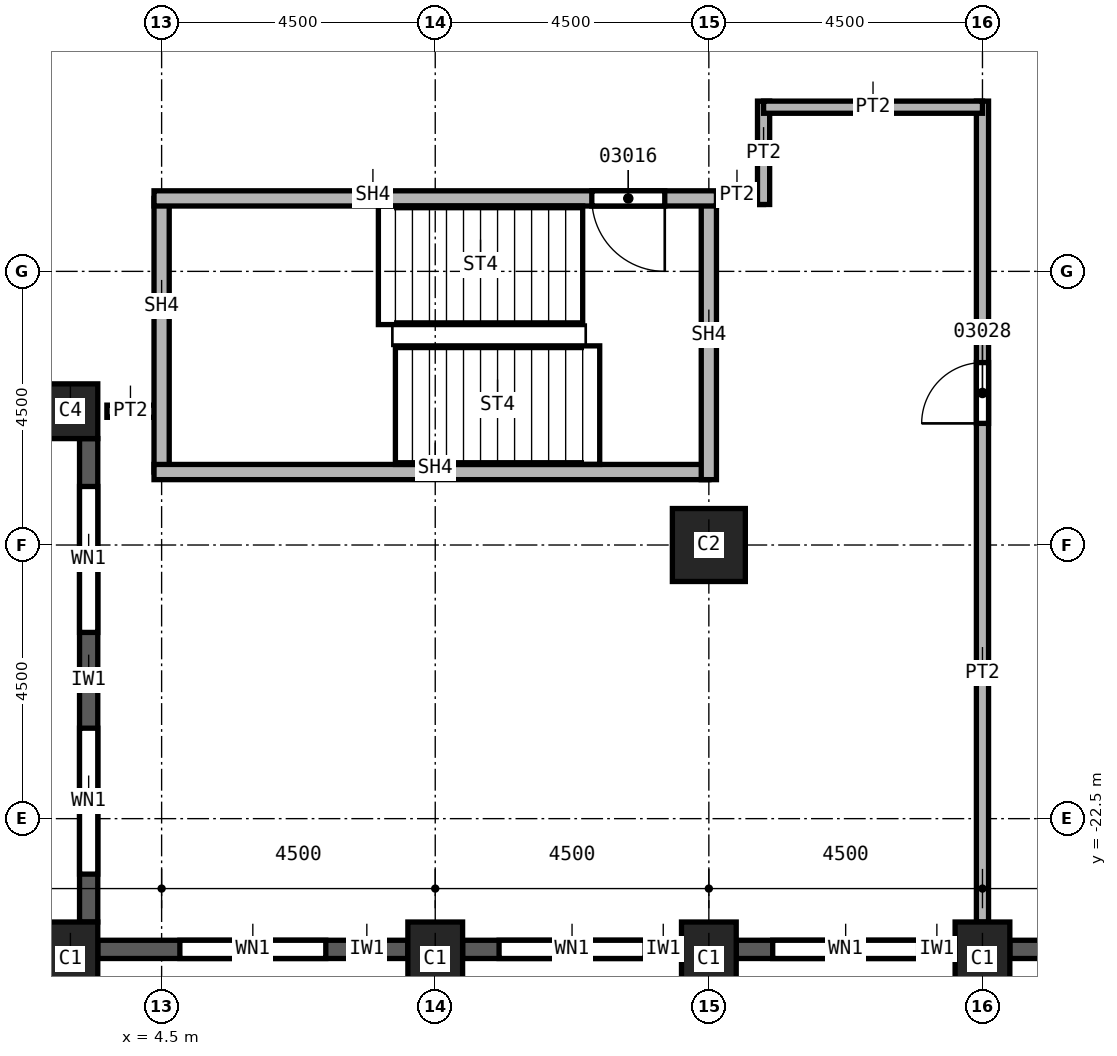
"""IFC4 building model, lengths in metres.
Left out: names, types, materials, properties, quantities, classifications, styles, units other than length and angle.
Written with IfcOpenShell. Run it as: python <this file> out.ifc"""

import sys

from ifc_helpers import new_model, si_unit, direction, frame, frame_2d, origin, origin_2d, place, context, subcontext, project, spatial, rectangle, extrude, element, fill, save


model = new_model("IFC4")
c1 = context("Model", 3, precision=1e-05, world=origin(), true_north=direction((0.0, 1.0)))
c2 = subcontext(c1, "Body", "Model", "MODEL_VIEW")
j1 = project(units=[si_unit("LENGTHUNIT", "METRE"), si_unit("PLANEANGLEUNIT", "RADIAN")], contexts=[c1])
p1 = place(None, origin())
s1 = spatial("IfcSite", under=j1, at=p1, CompositionType="ELEMENT")
p2 = place(p1, origin())
s2 = spatial("IfcBuilding", under=s1, at=p2, CompositionType="ELEMENT")
p3 = place(p2, frame((0.0, 0.0, 92.0)))
s3 = spatial("IfcBuildingStorey", under=s2, at=p3, CompositionType="ELEMENT", Elevation=92.0)
p4 = place(p3, frame((13.5, -18.0, 0.0), z_axis=(0.0, 0.0, 1.0), x_axis=(1.0, 0.0, 0.0)))
e1 = element("IfcColumn", 1, at=p4, inside=s3, PredefinedType="COLUMN", context=c2, shape_type="SweptSolid", body=[
    extrude(rectangle(XDim=1.2, YDim=1.2, at=origin_2d()), origin(), (0.0, 0.0, 1.0), 3.7),
])
for number, where, z_axis, x_axis in (
    (2, (3.0, -24.8, 0.0), (0.0, 0.0, 1.0), (1.0, 0.0, 0.0)),
    (3, (9.0, -24.8, 0.0), (0.0, 0.0, 1.0), (1.0, 0.0, 0.0)),
    (4, (13.5, -24.8, 0.0), (0.0, 0.0, 1.0), (1.0, 0.0, 0.0)),
    (5, (18.0, -24.8, 0.0), (0.0, 0.0, 1.0), (1.0, 0.0, 0.0)),
):
    element("IfcColumn", number, at=place(p3, frame(where, z_axis=z_axis, x_axis=x_axis)), inside=s3, PredefinedType="COLUMN", context=c2, shape_type="SweptSolid", body=[
        extrude(rectangle(XDim=0.9, YDim=1.2, at=origin_2d()), origin(), (0.0, 0.0, 1.0), 3.7),
    ])
p5 = place(p3, frame((3.0, -15.8, 0.0), z_axis=(0.0, 0.0, 1.0), x_axis=(1.0, 0.0, 0.0)))
e6 = element("IfcColumn", 6, at=p5, inside=s3, PredefinedType="COLUMN", context=c2, shape_type="SweptSolid", body=[
    extrude(rectangle(XDim=0.9, YDim=0.9, at=origin_2d()), origin(), (0.0, 0.0, 1.0), 3.7),
])
p6 = place(p3, frame((3.3, -16.25, 0.0), z_axis=(0.0, 0.0, 1.0), x_axis=(0.0, -1.0, 0.0)))
e7 = element("IfcWall", 7, at=p6, inside=s3, PredefinedType="SOLIDWALL", context=c2, shape_type="SweptSolid", body=[
    extrude(rectangle(XDim=7.95, YDim=0.3, at=frame_2d((3.975, 0.0))), origin(), (0.0, 0.0, 1.0), 3.1),
])
p7 = place(p6, frame((0.788, 0.0, 0.8)))
e8 = element("IfcOpeningElement", 8, at=p7, cuts=e7, PredefinedType="OPENING", context=c2, shape_type="SweptSolid", body=[
    extrude(rectangle(XDim=2.4, YDim=1.95, at=frame_2d((1.2, 0.975))), frame((0.0, 0.15, 0.0), z_axis=(0.0, -1.0, 0.0), x_axis=(1.0, 0.0, 0.0)), (0.0, 0.0, 1.0), 0.3),
])
p8 = place(p6, frame((4.762, 0.0, 0.8)))
e9 = element("IfcOpeningElement", 9, at=p8, cuts=e7, PredefinedType="OPENING", context=c2, shape_type="SweptSolid", body=[
    extrude(rectangle(XDim=2.4, YDim=1.95, at=frame_2d((1.2, 0.975))), frame((0.0, 0.15, 0.0), z_axis=(0.0, -1.0, 0.0), x_axis=(1.0, 0.0, 0.0)), (0.0, 0.0, 1.0), 0.3),
])
p9 = place(p3, frame((3.45, -24.65, 0.0), z_axis=(0.0, 0.0, 1.0), x_axis=(1.0, 0.0, 0.0)))
e10 = element("IfcWall", 10, at=p9, inside=s3, PredefinedType="SOLIDWALL", context=c2, shape_type="SweptSolid", body=[
    extrude(rectangle(XDim=5.1, YDim=0.3, at=frame_2d((2.55, 0.0))), origin(), (0.0, 0.0, 1.0), 3.1),
])
p10 = place(p9, frame((1.35, 0.0, 0.8)))
e11 = element("IfcOpeningElement", 11, at=p10, cuts=e10, PredefinedType="OPENING", context=c2, shape_type="SweptSolid", body=[
    extrude(rectangle(XDim=2.4, YDim=1.95, at=frame_2d((1.2, 0.975))), frame((0.0, 0.15, 0.0), z_axis=(0.0, -1.0, 0.0), x_axis=(1.0, 0.0, 0.0)), (0.0, 0.0, 1.0), 0.3),
])
p11 = place(p3, frame((9.45, -24.65, 0.0), z_axis=(0.0, 0.0, 1.0), x_axis=(1.0, 0.0, 0.0)))
e12 = element("IfcWall", 12, at=p11, inside=s3, PredefinedType="SOLIDWALL", context=c2, shape_type="SweptSolid", body=[
    extrude(rectangle(XDim=3.6, YDim=0.3, at=frame_2d((1.8, 0.0))), origin(), (0.0, 0.0, 1.0), 3.1),
])
p12 = place(p11, frame((0.6, 0.0, 0.8)))
e13 = element("IfcOpeningElement", 13, at=p12, cuts=e12, PredefinedType="OPENING", context=c2, shape_type="SweptSolid", body=[
    extrude(rectangle(XDim=2.4, YDim=1.95, at=frame_2d((1.2, 0.975))), frame((0.0, 0.15, 0.0), z_axis=(0.0, -1.0, 0.0), x_axis=(1.0, 0.0, 0.0)), (0.0, 0.0, 1.0), 0.3),
])
p13 = place(p3, frame((13.95, -24.65, 0.0), z_axis=(0.0, 0.0, 1.0), x_axis=(1.0, 0.0, 0.0)))
e14 = element("IfcWall", 14, at=p13, inside=s3, PredefinedType="SOLIDWALL", context=c2, shape_type="SweptSolid", body=[
    extrude(rectangle(XDim=3.6, YDim=0.3, at=frame_2d((1.8, 0.0))), origin(), (0.0, 0.0, 1.0), 3.1),
])
p14 = place(p13, frame((0.6, 0.0, 0.8)))
e15 = element("IfcOpeningElement", 15, at=p14, cuts=e14, PredefinedType="OPENING", context=c2, shape_type="SweptSolid", body=[
    extrude(rectangle(XDim=2.4, YDim=1.95, at=frame_2d((1.2, 0.975))), frame((0.0, 0.15, 0.0), z_axis=(0.0, -1.0, 0.0), x_axis=(1.0, 0.0, 0.0)), (0.0, 0.0, 1.0), 0.3),
])
p15 = place(p3, frame((18.45, -24.65, 0.0), z_axis=(0.0, 0.0, 1.0), x_axis=(1.0, 0.0, 0.0)))
e16 = element("IfcWall", 16, at=p15, inside=s3, PredefinedType="SOLIDWALL", context=c2, shape_type="SweptSolid", body=[
    extrude(rectangle(XDim=3.6, YDim=0.3, at=frame_2d((1.8, 0.0))), origin(), (0.0, 0.0, 1.0), 3.1),
])
p16 = place(p15, frame((0.625, 0.0, 0.8)))
e17 = element("IfcOpeningElement", 17, at=p16, cuts=e16, PredefinedType="OPENING", context=c2, shape_type="SweptSolid", body=[
    extrude(rectangle(XDim=0.6, YDim=1.95, at=frame_2d((0.3, 0.975))), frame((0.0, 0.15, 0.0), z_axis=(0.0, -1.0, 0.0), x_axis=(1.0, 0.0, 0.0)), (0.0, 0.0, 1.0), 0.3),
])
p17 = place(p15, frame((1.825, 0.0, 0.8)))
e18 = element("IfcOpeningElement", 18, at=p17, cuts=e16, PredefinedType="OPENING", context=c2, shape_type="SweptSolid", body=[
    extrude(rectangle(XDim=1.0, YDim=1.95, at=frame_2d((0.5, 0.975))), frame((0.0, 0.15, 0.0), z_axis=(0.0, -1.0, 0.0), x_axis=(1.0, 0.0, 0.0)), (0.0, 0.0, 1.0), 0.3),
])
p18 = place(p3, frame((4.5, -15.8, 0.0), z_axis=(0.0, 0.0, 1.0), x_axis=(-1.0, 0.0, 0.0)))
e19 = element("IfcWall", 19, at=p18, inside=s3, PredefinedType="PARTITIONING", context=c2, shape_type="SweptSolid", body=[
    extrude(rectangle(XDim=0.9, YDim=0.2, at=frame_2d((0.45, 0.0))), origin(), (0.0, 0.0, 1.0), 3.7),
])
p19 = place(p3, frame((14.4, -12.3, 0.0), z_axis=(0.0, 0.0, 1.0), x_axis=(-1.0, 0.0, 0.0)))
e20 = element("IfcWall", 20, at=p19, inside=s3, PredefinedType="PARTITIONING", context=c2, shape_type="SweptSolid", body=[
    extrude(rectangle(XDim=1.025, YDim=0.2, at=frame_2d((0.512, 0.0))), origin(), (0.0, 0.0, 1.0), 3.7),
])
p20 = place(p3, frame((14.4, -10.7, 0.0), z_axis=(0.0, 0.0, 1.0), x_axis=(0.0, -1.0, 0.0)))
e21 = element("IfcWall", 21, at=p20, inside=s3, PredefinedType="PARTITIONING", context=c2, shape_type="SweptSolid", body=[
    extrude(rectangle(XDim=1.7, YDim=0.2, at=frame_2d((0.85, 0.0))), origin(), (0.0, 0.0, 1.0), 3.7),
])
p21 = place(p3, frame((18.0, -24.2, 0.0), z_axis=(0.0, 0.0, 1.0), x_axis=(0.0, 1.0, 0.0)))
e22 = element("IfcWall", 22, at=p21, inside=s3, PredefinedType="PARTITIONING", context=c2, shape_type="SweptSolid", body=[
    extrude(rectangle(XDim=13.5, YDim=0.2, at=frame_2d((6.75, 0.0))), origin(), (0.0, 0.0, 1.0), 3.7),
])
p22 = place(p21, frame((8.2, 0.0, 0.0)))
e23 = element("IfcOpeningElement", 23, at=p22, cuts=e22, PredefinedType="OPENING", context=c2, shape_type="SweptSolid", body=[
    extrude(rectangle(XDim=1.0, YDim=2.1, at=frame_2d((0.5, 1.05))), frame((0.0, 0.1, 0.0), z_axis=(0.0, -1.0, 0.0), x_axis=(1.0, 0.0, 0.0)), (0.0, 0.0, 1.0), 0.2),
])
p23 = place(p3, frame((18.0, -10.8, 0.0), z_axis=(0.0, 0.0, 1.0), x_axis=(-1.0, 0.0, 0.0)))
e24 = element("IfcWall", 24, at=p23, inside=s3, PredefinedType="PARTITIONING", context=c2, shape_type="SweptSolid", body=[
    extrude(rectangle(XDim=3.6, YDim=0.2, at=frame_2d((1.8, 0.0))), origin(), (0.0, 0.0, 1.0), 3.7),
])
p24 = place(p3, frame((4.5, -16.8, 0.0), z_axis=(0.0, 0.0, 1.0), x_axis=(0.0, 1.0, 0.0)))
e25 = element("IfcWall", 25, at=p24, inside=s3, PredefinedType="SOLIDWALL", context=c2, shape_type="SweptSolid", body=[
    extrude(rectangle(XDim=4.5, YDim=0.25, at=frame_2d((2.25, 0.0))), origin(), (0.0, 0.0, 1.0), 3.7),
])
p25 = place(p3, frame((13.5, -16.8, 0.0), z_axis=(0.0, 0.0, 1.0), x_axis=(-1.0, 0.0, 0.0)))
e26 = element("IfcWall", 26, at=p25, inside=s3, PredefinedType="SOLIDWALL", context=c2, shape_type="SweptSolid", body=[
    extrude(rectangle(XDim=9.125, YDim=0.25, at=frame_2d((4.562, 0.0))), origin(), (0.0, 0.0, 1.0), 3.7),
])
p26 = place(p3, frame((13.5, -12.3, 0.0), z_axis=(0.0, 0.0, 1.0), x_axis=(0.0, -1.0, 0.0)))
e27 = element("IfcWall", 27, at=p26, inside=s3, PredefinedType="SOLIDWALL", context=c2, shape_type="SweptSolid", body=[
    extrude(rectangle(XDim=4.625, YDim=0.25, at=frame_2d((2.312, 0.0))), origin(), (0.0, 0.0, 1.0), 3.7),
])
p27 = place(p3, frame((13.625, -12.3, 0.0), z_axis=(0.0, 0.0, 1.0), x_axis=(-1.0, 0.0, 0.0)))
e28 = element("IfcWall", 28, at=p27, inside=s3, PredefinedType="SOLIDWALL", context=c2, shape_type="SweptSolid", body=[
    extrude(rectangle(XDim=9.25, YDim=0.25, at=frame_2d((4.625, 0.0))), origin(), (0.0, 0.0, 1.0), 3.7),
])
p28 = place(p27, frame((0.85, 0.0, 0.0)))
e29 = element("IfcOpeningElement", 29, at=p28, cuts=e28, PredefinedType="OPENING", context=c2, shape_type="SweptSolid", body=[
    extrude(rectangle(XDim=1.2, YDim=2.1, at=frame_2d((0.6, 1.05))), frame((0.0, 0.125, 0.0), z_axis=(0.0, -1.0, 0.0), x_axis=(1.0, 0.0, 0.0)), (0.0, 0.0, 1.0), 0.25),
])
p29 = place(p7, origin())
e30 = element("IfcWindow", 30, at=p29, inside=s3, PartitioningType="SINGLE_PANEL", PredefinedType="WINDOW", context=c2, shape_type="SweptSolid", body=[
    extrude(rectangle(XDim=2.4, YDim=1.95, at=frame_2d((1.2, 0.975))), frame((0.0, 0.03, 0.0), z_axis=(0.0, -1.0, 0.0), x_axis=(1.0, 0.0, 0.0)), (0.0, 0.0, 1.0), 0.06),
])
fill(e8, e30)
p30 = place(p8, origin())
e31 = element("IfcWindow", 31, at=p30, inside=s3, PartitioningType="SINGLE_PANEL", PredefinedType="WINDOW", context=c2, shape_type="SweptSolid", body=[
    extrude(rectangle(XDim=2.4, YDim=1.95, at=frame_2d((1.2, 0.975))), frame((0.0, 0.03, 0.0), z_axis=(0.0, -1.0, 0.0), x_axis=(1.0, 0.0, 0.0)), (0.0, 0.0, 1.0), 0.06),
])
fill(e9, e31)
p31 = place(p10, origin())
e32 = element("IfcWindow", 32, at=p31, inside=s3, PartitioningType="SINGLE_PANEL", PredefinedType="WINDOW", context=c2, shape_type="SweptSolid", body=[
    extrude(rectangle(XDim=2.4, YDim=1.95, at=frame_2d((1.2, 0.975))), frame((0.0, 0.03, 0.0), z_axis=(0.0, -1.0, 0.0), x_axis=(1.0, 0.0, 0.0)), (0.0, 0.0, 1.0), 0.06),
])
fill(e11, e32)
p32 = place(p12, origin())
e33 = element("IfcWindow", 33, at=p32, inside=s3, PartitioningType="SINGLE_PANEL", PredefinedType="WINDOW", context=c2, shape_type="SweptSolid", body=[
    extrude(rectangle(XDim=2.4, YDim=1.95, at=frame_2d((1.2, 0.975))), frame((0.0, 0.03, 0.0), z_axis=(0.0, -1.0, 0.0), x_axis=(1.0, 0.0, 0.0)), (0.0, 0.0, 1.0), 0.06),
])
fill(e13, e33)
p33 = place(p14, origin())
e34 = element("IfcWindow", 34, at=p33, inside=s3, PartitioningType="SINGLE_PANEL", PredefinedType="WINDOW", context=c2, shape_type="SweptSolid", body=[
    extrude(rectangle(XDim=2.4, YDim=1.95, at=frame_2d((1.2, 0.975))), frame((0.0, 0.03, 0.0), z_axis=(0.0, -1.0, 0.0), x_axis=(1.0, 0.0, 0.0)), (0.0, 0.0, 1.0), 0.06),
])
fill(e15, e34)
p34 = place(p28, origin())
e35 = element("IfcDoor", 35, at=p34, inside=s3, OperationType="SINGLE_SWING_LEFT", PredefinedType="DOOR", context=c2, shape_type="SweptSolid", body=[
    extrude(rectangle(XDim=1.2, YDim=2.1, at=frame_2d((0.6, 1.05))), frame((0.0, 0.025, 0.0), z_axis=(0.0, -1.0, 0.0), x_axis=(1.0, 0.0, 0.0)), (0.0, 0.0, 1.0), 0.05),
])
fill(e29, e35)
p35 = place(p22, origin())
e36 = element("IfcDoor", 36, at=p35, inside=s3, OperationType="SINGLE_SWING_LEFT", PredefinedType="DOOR", context=c2, shape_type="SweptSolid", body=[
    extrude(rectangle(XDim=1.0, YDim=2.1, at=frame_2d((0.5, 1.05))), frame((0.0, 0.025, 0.0), z_axis=(0.0, -1.0, 0.0), x_axis=(1.0, 0.0, 0.0)), (0.0, 0.0, 1.0), 0.05),
])
fill(e23, e36)
save(model, sys.argv[1])
